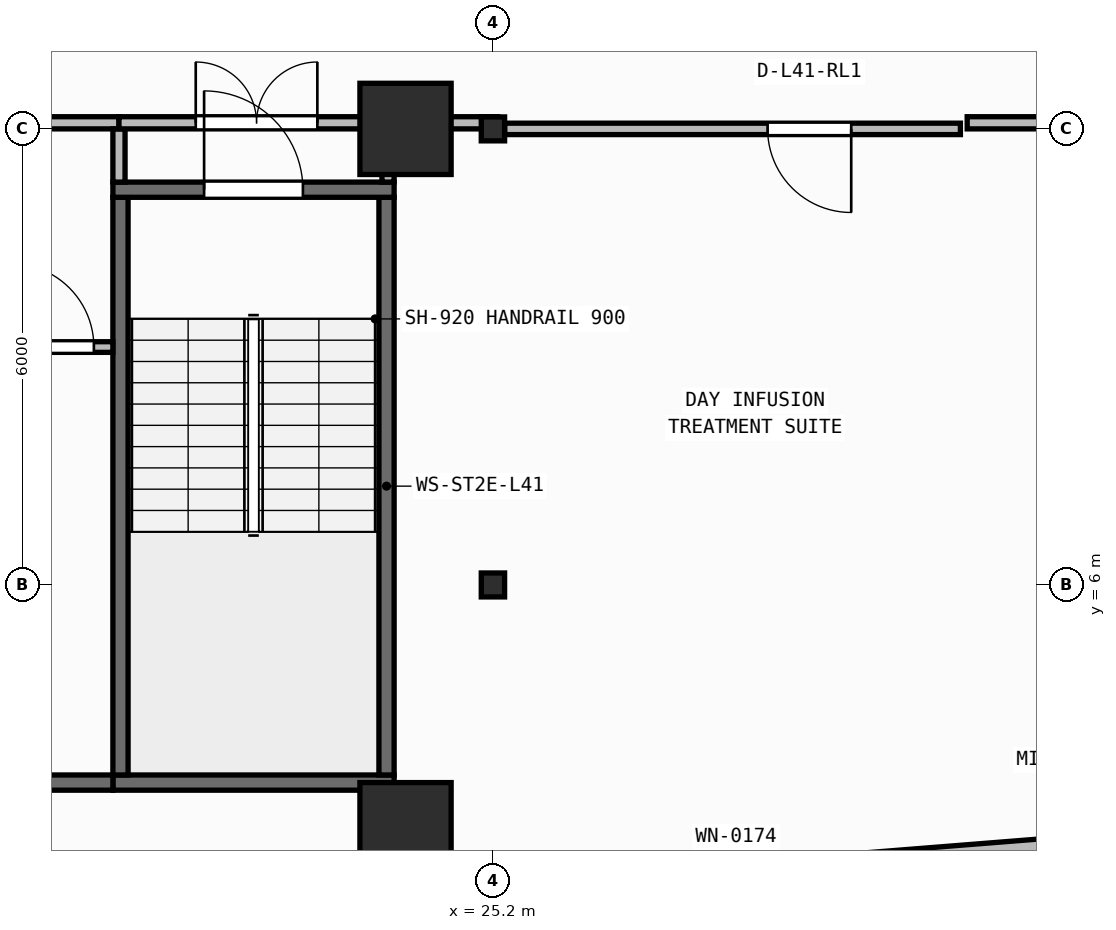
"""IFC4 building model, lengths in metres.
Left out: names, types, materials, properties, quantities, classifications, styles, units other than length and angle.
Written with IfcOpenShell. Run it as: python <this file> out.ifc"""

import sys

from ifc_helpers import new_model, si_unit, direction, frame, frame_2d, origin, origin_2d, place, context, subcontext, project, spatial, rectangle, i_section, extrude, element, fill, save


model = new_model("IFC4")
c1 = context("Model", 3, precision=1e-05, world=origin(), true_north=direction((0.0, 1.0)))
c2 = subcontext(c1, "Body", "Model", "MODEL_VIEW")
j1 = project(units=[si_unit("LENGTHUNIT", "METRE"), si_unit("PLANEANGLEUNIT", "RADIAN")], contexts=[c1])
p1 = place(None, origin())
s1 = spatial("IfcSite", under=j1, at=p1, CompositionType="ELEMENT")
p2 = place(p1, origin())
s2 = spatial("IfcBuilding", under=s1, at=p2, CompositionType="ELEMENT")
p3 = place(p2, frame((0.0, 0.0, 166.55)))
s3 = spatial("IfcBuildingStorey", under=s2, at=p3, CompositionType="ELEMENT", Elevation=166.55)
p4 = place(p3, frame((24.05, 2.8, 0.0), z_axis=(0.0, 0.0, 1.0), x_axis=(1.0, 0.0, 0.0)))
e1 = element("IfcColumn", 1, at=p4, inside=s3, PredefinedType="COLUMN", context=c2, shape_type="SweptSolid", body=[
    extrude(rectangle(XDim=1.2, YDim=1.2, at=origin_2d()), origin(), (0.0, 0.0, 1.0), 3.95),
])
p5 = place(p3, frame((25.2, 6.0, 0.0), z_axis=(0.0, 0.0, 1.0), x_axis=(1.0, 0.0, 0.0)))
e2 = element("IfcColumn", 2, at=p5, inside=s3, PredefinedType="COLUMN", context=c2, shape_type="SweptSolid", body=[
    extrude(i_section(OverallWidth=0.307, OverallDepth=0.315, WebThickness=0.012, FlangeThickness=0.019, FilletRadius=0.017, at=origin_2d()), origin(), (0.0, 0.0, 1.0), 3.95),
])
p6 = place(p3, frame((24.05, 12.0, 0.0), z_axis=(0.0, 0.0, 1.0), x_axis=(1.0, 0.0, 0.0)))
e3 = element("IfcColumn", 3, at=p6, inside=s3, PredefinedType="COLUMN", context=c2, shape_type="SweptSolid", body=[
    extrude(rectangle(XDim=1.2, YDim=1.2, at=origin_2d()), origin(), (0.0, 0.0, 1.0), 3.95),
])
p7 = place(p3, frame((25.2, 12.0, 0.0), z_axis=(0.0, 0.0, 1.0), x_axis=(1.0, 0.0, 0.0)))
e4 = element("IfcColumn", 4, at=p7, inside=s3, PredefinedType="COLUMN", context=c2, shape_type="SweptSolid", body=[
    extrude(i_section(OverallWidth=0.307, OverallDepth=0.315, WebThickness=0.012, FlangeThickness=0.019, FilletRadius=0.017, at=origin_2d()), origin(), (0.0, 0.0, 1.0), 3.95),
])
p8 = place(p3, frame((2.76, 0.173, 0.0), z_axis=(0.0, 0.0, 1.0), x_axis=(0.996857931723, 0.079210251617, 0.0)))
e5 = element("IfcWall", 5, at=p8, inside=s3, PredefinedType="STANDARD", context=c2, shape_type="SweptSolid", body=[
    extrude(rectangle(XDim=51.442, YDim=0.26, at=frame_2d((25.721, 0.0))), origin(), (0.0, 0.0, 1.0), 3.71),
])
p9 = place(p8, frame((24.521, 0.0, 0.9)))
e6 = element("IfcOpeningElement", 6, at=p9, cuts=e5, PredefinedType="OPENING", context=c2, shape_type="SweptSolid", body=[
    extrude(rectangle(XDim=2.4, YDim=1.65, at=frame_2d((1.2, 0.825))), frame((0.0, 0.14, 0.0), z_axis=(0.0, -1.0, 0.0), x_axis=(1.0, 0.0, 0.0)), (0.0, 0.0, 1.0), 0.28),
])
p10 = place(p3, frame((20.2, 3.4, 0.0), z_axis=(0.0, 0.0, 1.0), x_axis=(1.0, 0.0, 0.0)))
e7 = element("IfcWall", 7, at=p10, inside=s3, PredefinedType="SHEAR", context=c2, shape_type="SweptSolid", body=[
    extrude(rectangle(XDim=3.7, YDim=0.2, at=frame_2d((1.85, 0.0))), origin(), (0.0, 0.0, 1.0), 3.71),
])
for number, where, z_axis, x_axis in (
    (8, (20.3, 3.5, 0.0), (0.0, 0.0, 1.0), (0.0, 1.0, 0.0)),
    (9, (23.8, 3.5, 0.0), (0.0, 0.0, 1.0), (0.0, 1.0, 0.0)),
):
    element("IfcWall", number, at=place(p3, frame(where, z_axis=z_axis, x_axis=x_axis)), inside=s3, PredefinedType="SHEAR", context=c2, shape_type="SweptSolid", body=[
        extrude(rectangle(XDim=7.6, YDim=0.2, at=frame_2d((3.8, 0.0))), origin(), (0.0, 0.0, 1.0), 3.71),
    ])
p11 = place(p3, frame((20.2, 11.2, 0.0), z_axis=(0.0, 0.0, 1.0), x_axis=(1.0, 0.0, 0.0)))
e10 = element("IfcWall", 10, at=p11, inside=s3, PredefinedType="SHEAR", context=c2, shape_type="SweptSolid", body=[
    extrude(rectangle(XDim=3.7, YDim=0.2, at=frame_2d((1.85, 0.0))), origin(), (0.0, 0.0, 1.0), 3.71),
])
p12 = place(p11, frame((1.2, 0.0, 0.0)))
e11 = element("IfcOpeningElement", 11, at=p12, cuts=e10, PredefinedType="OPENING", context=c2, shape_type="SweptSolid", body=[
    extrude(rectangle(XDim=1.3, YDim=2.15, at=frame_2d((0.65, 1.075))), frame((0.0, 0.11, 0.0), z_axis=(0.0, -1.0, 0.0), x_axis=(1.0, 0.0, 0.0)), (0.0, 0.0, 1.0), 0.22),
])
p13 = place(p3, frame((6.5, 3.4, 0.0), z_axis=(0.0, 0.0, 1.0), x_axis=(1.0, 0.0, 0.0)))
e12 = element("IfcWall", 12, at=p13, inside=s3, PredefinedType="SHEAR", context=c2, shape_type="SweptSolid", body=[
    extrude(rectangle(XDim=13.7, YDim=0.2, at=frame_2d((6.85, 0.0))), origin(), (0.0, 0.0, 1.0), 3.71),
])
p14 = place(p3, frame((18.61, 9.13, 0.0), z_axis=(0.0, 0.0, 1.0), x_axis=(1.0, 0.0, 0.0)))
e13 = element("IfcWall", 13, at=p14, inside=s3, PredefinedType="PARTITIONING", context=c2, shape_type="SweptSolid", body=[
    extrude(rectangle(XDim=1.59, YDim=0.14, at=frame_2d((0.795, 0.0))), origin(), (0.0, 0.0, 1.0), 3.71),
])
p15 = place(p14, frame((0.24, 0.0, 0.0)))
e14 = element("IfcOpeningElement", 14, at=p15, cuts=e13, PredefinedType="OPENING", context=c2, shape_type="SweptSolid", body=[
    extrude(rectangle(XDim=1.1, YDim=2.1, at=frame_2d((0.55, 1.05))), frame((0.0, 0.08, 0.0), z_axis=(0.0, -1.0, 0.0), x_axis=(1.0, 0.0, 0.0)), (0.0, 0.0, 1.0), 0.16),
])
p16 = place(p3, frame((12.58, 12.08, 0.0), z_axis=(0.0, 0.0, 1.0), x_axis=(1.0, 0.0, 0.0)))
e15 = element("IfcWall", 15, at=p16, inside=s3, PredefinedType="PARTITIONING", context=c2, shape_type="SweptSolid", body=[
    extrude(rectangle(XDim=7.7, YDim=0.16, at=frame_2d((3.85, 0.0))), origin(), (0.0, 0.0, 1.0), 3.083),
])
p17 = place(p16, frame((3.05, 0.0, 0.0)))
e16 = element("IfcOpeningElement", 16, at=p17, cuts=e15, PredefinedType="OPENING", context=c2, shape_type="SweptSolid", body=[
    extrude(rectangle(XDim=1.6, YDim=2.05, at=frame_2d((0.8, 1.025))), frame((0.0, 0.09, 0.0), z_axis=(0.0, -1.0, 0.0), x_axis=(1.0, 0.0, 0.0)), (0.0, 0.0, 1.0), 0.18),
])
p18 = place(p3, frame((20.28, 11.3, 0.0), z_axis=(0.0, 0.0, 1.0), x_axis=(0.0, 1.0, 0.0)))
e17 = element("IfcWall", 17, at=p18, inside=s3, PredefinedType="PARTITIONING", context=c2, shape_type="SweptSolid", body=[
    extrude(rectangle(XDim=0.7, YDim=0.16, at=frame_2d((0.35, 0.0))), origin(), (0.0, 0.0, 1.0), 3.71),
])
p19 = place(p3, frame((20.28, 12.08, 0.0), z_axis=(0.0, 0.0, 1.0), x_axis=(1.0, 0.0, 0.0)))
e18 = element("IfcWall", 18, at=p19, inside=s3, PredefinedType="PARTITIONING", context=c2, shape_type="SweptSolid", body=[
    extrude(rectangle(XDim=3.62, YDim=0.16, at=frame_2d((1.81, 0.0))), origin(), (0.0, 0.0, 1.0), 3.083),
])
p20 = place(p19, frame((1.01, 0.0, 0.0)))
e19 = element("IfcOpeningElement", 19, at=p20, cuts=e18, PredefinedType="OPENING", context=c2, shape_type="SweptSolid", body=[
    extrude(rectangle(XDim=1.6, YDim=2.05, at=frame_2d((0.8, 1.025))), frame((0.0, 0.09, 0.0), z_axis=(0.0, -1.0, 0.0), x_axis=(1.0, 0.0, 0.0)), (0.0, 0.0, 1.0), 0.18),
])
p21 = place(p3, frame((23.82, 11.3, 0.0), z_axis=(0.0, 0.0, 1.0), x_axis=(0.0, 1.0, 0.0)))
e20 = element("IfcWall", 20, at=p21, inside=s3, PredefinedType="PARTITIONING", context=c2, shape_type="SweptSolid", body=[
    extrude(rectangle(XDim=0.7, YDim=0.16, at=frame_2d((0.35, 0.0))), origin(), (0.0, 0.0, 1.0), 3.71),
])
p22 = place(p3, frame((31.35, 12.0, 0.0), z_axis=(0.0, 0.0, 1.0), x_axis=(-1.0, 0.0, 0.0)))
e21 = element("IfcWall", 21, at=p22, inside=s3, PredefinedType="PARTITIONING", context=c2, shape_type="SweptSolid", body=[
    extrude(rectangle(XDim=5.997, YDim=0.15, at=frame_2d((2.998, 0.0))), origin(), (0.0, 0.0, 1.0), 3.083),
])
p23 = place(p22, frame((1.437, 0.0, 0.0)))
e22 = element("IfcOpeningElement", 22, at=p23, cuts=e21, PredefinedType="OPENING", context=c2, shape_type="SweptSolid", body=[
    extrude(rectangle(XDim=1.1, YDim=2.1, at=frame_2d((0.55, 1.05))), frame((0.0, 0.085, 0.0), z_axis=(0.0, -1.0, 0.0), x_axis=(1.0, 0.0, 0.0)), (0.0, 0.0, 1.0), 0.17),
])
p24 = place(p3, frame((24.02, 12.08, 0.0), z_axis=(0.0, 0.0, 1.0), x_axis=(1.0, 0.0, 0.0)))
e23 = element("IfcWall", 23, at=p24, inside=s3, PredefinedType="PARTITIONING", context=c2, shape_type="SweptSolid", body=[
    extrude(rectangle(XDim=1.244, YDim=0.16, at=frame_2d((0.622, 0.0))), origin(), (0.0, 0.0, 1.0), 3.083),
])
p25 = place(p3, frame((31.439, 12.08, 0.0), z_axis=(0.0, 0.0, 1.0), x_axis=(1.0, 0.0, 0.0)))
e24 = element("IfcWall", 24, at=p25, inside=s3, PredefinedType="PARTITIONING", context=c2, shape_type="SweptSolid", body=[
    extrude(rectangle(XDim=2.631, YDim=0.16, at=frame_2d((1.315, 0.0))), origin(), (0.0, 0.0, 1.0), 3.083),
])
p26 = place(p12, origin())
e25 = element("IfcDoor", 25, at=p26, inside=s3, OperationType="SINGLE_SWING_LEFT", PredefinedType="DOOR", context=c2, shape_type="SweptSolid", body=[
    extrude(rectangle(XDim=1.3, YDim=2.15, at=frame_2d((0.65, 1.075))), frame((0.0, 0.025, 0.0), z_axis=(0.0, -1.0, 0.0), x_axis=(1.0, 0.0, 0.0)), (0.0, 0.0, 1.0), 0.05),
])
fill(e11, e25)
p27 = place(p15, origin())
e26 = element("IfcDoor", 26, at=p27, inside=s3, OperationType="SINGLE_SWING_LEFT", PredefinedType="DOOR", context=c2, shape_type="SweptSolid", body=[
    extrude(rectangle(XDim=1.1, YDim=2.1, at=frame_2d((0.55, 1.05))), frame((0.0, 0.025, 0.0), z_axis=(0.0, -1.0, 0.0), x_axis=(1.0, 0.0, 0.0)), (0.0, 0.0, 1.0), 0.05),
])
fill(e14, e26)
p28 = place(p20, origin())
e27 = element("IfcDoor", 27, at=p28, inside=s3, OperationType="DOUBLE_DOOR_SINGLE_SWING", PredefinedType="DOOR", context=c2, shape_type="SweptSolid", body=[
    extrude(rectangle(XDim=1.6, YDim=2.05, at=frame_2d((0.8, 1.025))), frame((0.0, 0.025, 0.0), z_axis=(0.0, -1.0, 0.0), x_axis=(1.0, 0.0, 0.0)), (0.0, 0.0, 1.0), 0.05),
])
fill(e19, e27)
p29 = place(p23, origin())
e28 = element("IfcDoor", 28, at=p29, inside=s3, OperationType="SINGLE_SWING_LEFT", PredefinedType="DOOR", context=c2, shape_type="SweptSolid", body=[
    extrude(rectangle(XDim=1.1, YDim=2.1, at=frame_2d((0.55, 1.05))), frame((0.0, 0.025, 0.0), z_axis=(0.0, -1.0, 0.0), x_axis=(1.0, 0.0, 0.0)), (0.0, 0.0, 1.0), 0.05),
])
fill(e22, e28)
save(model, sys.argv[1])
